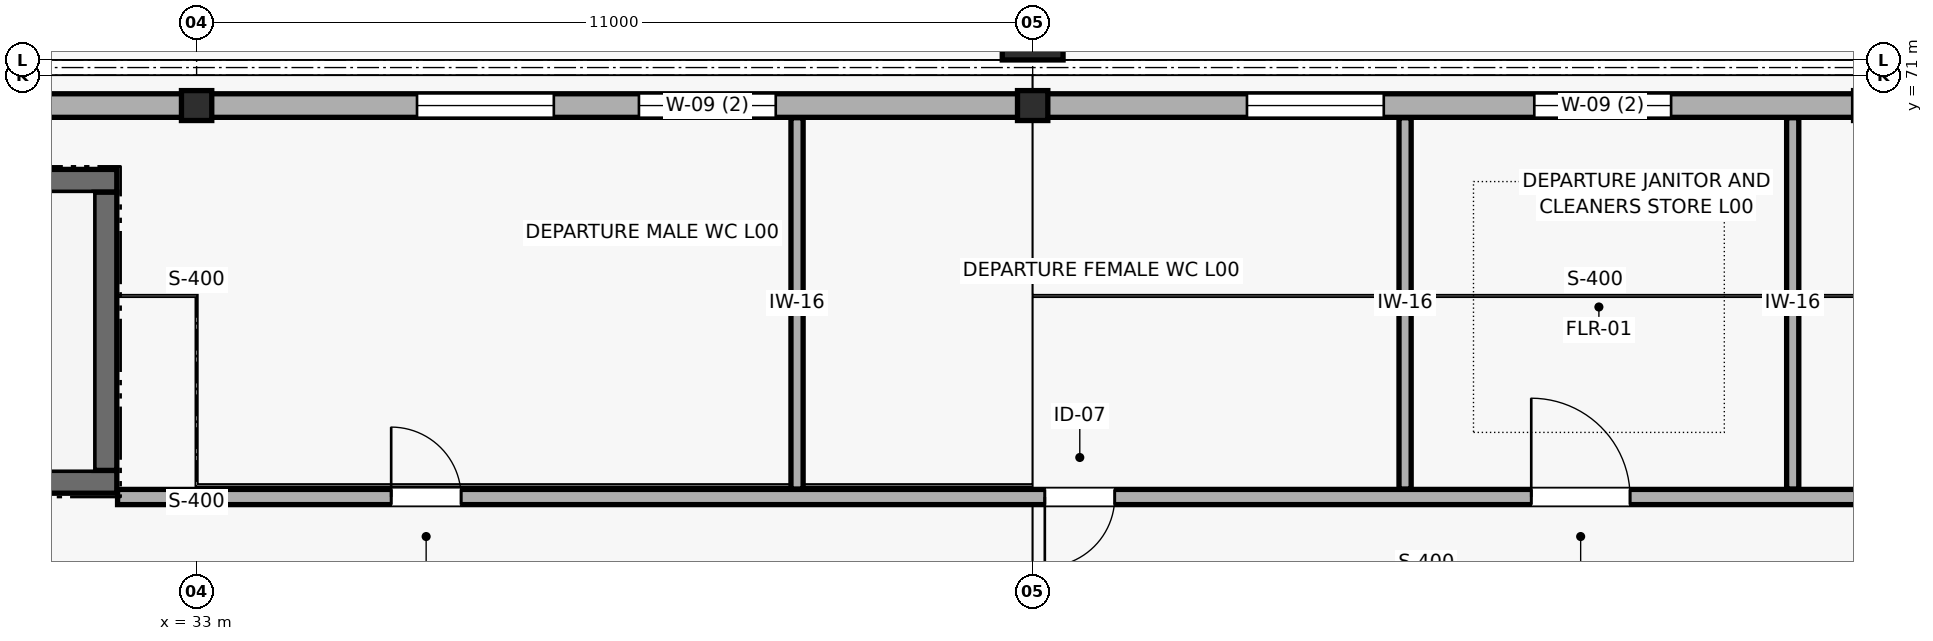
"""IFC4 building model, lengths in metres.
Left out: names, types, materials, properties, quantities, classifications, styles, units other than length and angle.
Written with IfcOpenShell. Run it as: python <this file> out.ifc"""

import sys

from ifc_helpers import new_model, si_unit, direction, frame, frame_2d, origin, origin_2d, place, context, subcontext, project, spatial, rectangle, i_section, extrude, element, fill, save


model = new_model("IFC4")
c1 = context("Model", 3, precision=1e-05, world=origin(), true_north=direction((0.0, 1.0)))
c2 = subcontext(c1, "Body", "Model", "MODEL_VIEW")
j1 = project(units=[si_unit("LENGTHUNIT", "METRE"), si_unit("PLANEANGLEUNIT", "RADIAN")], contexts=[c1])
p1 = place(None, origin())
s1 = spatial("IfcSite", under=j1, at=p1, CompositionType="ELEMENT")
p2 = place(p1, origin())
s2 = spatial("IfcBuilding", under=s1, at=p2, CompositionType="ELEMENT")
p3 = place(p2, origin())
s3 = spatial("IfcBuildingStorey", under=s2, at=p3, CompositionType="ELEMENT", Elevation=0.0)
for number, where, z_axis, x_axis in (
    (1, (33.0, 70.6, 0.0), (0.0, 0.0, 1.0), (1.0, 0.0, 0.0)),
    (2, (44.0, 70.6, 0.0), (0.0, 0.0, 1.0), (1.0, 0.0, 0.0)),
):
    element("IfcColumn", number, at=place(p3, frame(where, z_axis=z_axis, x_axis=x_axis)), inside=s3, PredefinedType="COLUMN", context=c2, shape_type="SweptSolid", body=[
        extrude(i_section(OverallWidth=0.399, OverallDepth=0.394, WebThickness=0.023, FlangeThickness=0.037, FilletRadius=0.018, at=origin_2d()), origin(), (0.0, 0.0, 1.0), 5.4),
    ])
p4 = place(p3, frame((44.0, 71.6, 0.0), z_axis=(0.0, 0.0, 1.0), x_axis=(1.0, 0.0, 0.0)))
e3 = element("IfcColumn", 3, at=p4, inside=s3, PredefinedType="COLUMN", context=c2, shape_type="SweptSolid", body=[
    extrude(rectangle(XDim=0.8, YDim=0.8, at=origin_2d()), origin(), (0.0, 0.0, 1.0), 5.4),
])
p5 = place(p3, frame((32.991, 70.6, 0.0), z_axis=(0.0, 0.0, 1.0), x_axis=(-1.0, 0.0, 0.0)))
e4 = element("IfcWall", 4, at=p5, inside=s3, PredefinedType="SOLIDWALL", context=c2, shape_type="SweptSolid", body=[
    extrude(rectangle(XDim=10.981, YDim=0.31, at=frame_2d((5.491, 0.0))), origin(), (0.0, 0.0, 1.0), 4.315),
])
p6 = place(p5, frame((2.591, 0.0, 1.05)))
e5 = element("IfcOpeningElement", 5, at=p6, cuts=e4, PredefinedType="OPENING", context=c2, shape_type="SweptSolid", body=[
    extrude(rectangle(XDim=1.8, YDim=1.8, at=frame_2d((0.9, 0.9))), frame((0.0, 0.165, 0.0), z_axis=(0.0, -1.0, 0.0), x_axis=(1.0, 0.0, 0.0)), (0.0, 0.0, 1.0), 0.33),
])
p7 = place(p5, frame((6.291, 0.0, 1.05)))
e6 = element("IfcOpeningElement", 6, at=p7, cuts=e4, PredefinedType="OPENING", context=c2, shape_type="SweptSolid", body=[
    extrude(rectangle(XDim=1.8, YDim=1.8, at=frame_2d((0.9, 0.9))), frame((0.0, 0.165, 0.0), z_axis=(0.0, -1.0, 0.0), x_axis=(1.0, 0.0, 0.0)), (0.0, 0.0, 1.0), 0.33),
])
p8 = place(p3, frame((43.991, 70.6, 0.0), z_axis=(0.0, 0.0, 1.0), x_axis=(-1.0, 0.0, 0.0)))
e7 = element("IfcWall", 7, at=p8, inside=s3, PredefinedType="SOLIDWALL", context=c2, shape_type="SweptSolid", body=[
    extrude(rectangle(XDim=10.981, YDim=0.31, at=frame_2d((5.491, 0.0))), origin(), (0.0, 0.0, 1.0), 4.315),
])
p9 = place(p8, frame((3.371, 0.0, 1.05)))
e8 = element("IfcOpeningElement", 8, at=p9, cuts=e7, PredefinedType="OPENING", context=c2, shape_type="SweptSolid", body=[
    extrude(rectangle(XDim=1.8, YDim=1.8, at=frame_2d((0.9, 0.9))), frame((0.0, 0.165, 0.0), z_axis=(0.0, -1.0, 0.0), x_axis=(1.0, 0.0, 0.0)), (0.0, 0.0, 1.0), 0.33),
])
p10 = place(p8, frame((6.291, 0.0, 1.05)))
e9 = element("IfcOpeningElement", 9, at=p10, cuts=e7, PredefinedType="OPENING", context=c2, shape_type="SweptSolid", body=[
    extrude(rectangle(XDim=1.8, YDim=1.8, at=frame_2d((0.9, 0.9))), frame((0.0, 0.165, 0.0), z_axis=(0.0, -1.0, 0.0), x_axis=(1.0, 0.0, 0.0)), (0.0, 0.0, 1.0), 0.33),
])
p11 = place(p3, frame((54.991, 70.6, 0.0), z_axis=(0.0, 0.0, 1.0), x_axis=(-1.0, 0.0, 0.0)))
e10 = element("IfcWall", 10, at=p11, inside=s3, PredefinedType="SOLIDWALL", context=c2, shape_type="SweptSolid", body=[
    extrude(rectangle(XDim=10.981, YDim=0.31, at=frame_2d((5.491, 0.0))), origin(), (0.0, 0.0, 1.0), 4.315),
])
p12 = place(p11, frame((2.591, 0.0, 1.05)))
e11 = element("IfcOpeningElement", 11, at=p12, cuts=e10, PredefinedType="OPENING", context=c2, shape_type="SweptSolid", body=[
    extrude(rectangle(XDim=1.8, YDim=1.8, at=frame_2d((0.9, 0.9))), frame((0.0, 0.165, 0.0), z_axis=(0.0, -1.0, 0.0), x_axis=(1.0, 0.0, 0.0)), (0.0, 0.0, 1.0), 0.33),
])
p13 = place(p11, frame((6.371, 0.0, 1.05)))
e12 = element("IfcOpeningElement", 12, at=p13, cuts=e10, PredefinedType="OPENING", context=c2, shape_type="SweptSolid", body=[
    extrude(rectangle(XDim=1.8, YDim=1.8, at=frame_2d((0.9, 0.9))), frame((0.0, 0.165, 0.0), z_axis=(0.0, -1.0, 0.0), x_axis=(1.0, 0.0, 0.0)), (0.0, 0.0, 1.0), 0.33),
])
p14 = place(p3, frame((23.3, 65.65, 0.0), z_axis=(0.0, 0.0, 1.0), x_axis=(1.0, 0.0, 0.0)))
e13 = element("IfcWall", 13, at=p14, inside=s3, PredefinedType="SHEAR", context=c2, shape_type="SweptSolid", body=[
    extrude(rectangle(XDim=8.65, YDim=0.3, at=frame_2d((4.325, 0.0))), origin(), (0.0, 0.0, 1.0), 5.1),
])
p15 = place(p14, frame((0.55, 0.0, 0.0)))
e14 = element("IfcOpeningElement", 14, at=p15, cuts=e13, PredefinedType="OPENING", context=c2, shape_type="SweptSolid", body=[
    extrude(rectangle(XDim=1.35, YDim=2.2, at=frame_2d((0.675, 1.1))), frame((0.0, 0.16, 0.0), z_axis=(0.0, -1.0, 0.0), x_axis=(1.0, 0.0, 0.0)), (0.0, 0.0, 1.0), 0.32),
])
p16 = place(p3, frame((31.95, 69.61, 0.0), z_axis=(0.0, 0.0, 1.0), x_axis=(-1.0, 0.0, 0.0)))
e15 = element("IfcWall", 15, at=p16, inside=s3, PredefinedType="SHEAR", context=c2, shape_type="SweptSolid", body=[
    extrude(rectangle(XDim=8.65, YDim=0.3, at=frame_2d((4.325, 0.0))), origin(), (0.0, 0.0, 1.0), 5.1),
])
p17 = place(p3, frame((31.8, 65.8, 0.0), z_axis=(0.0, 0.0, 1.0), x_axis=(0.0, 1.0, 0.0)))
e16 = element("IfcWall", 16, at=p17, inside=s3, PredefinedType="SHEAR", context=c2, shape_type="SweptSolid", body=[
    extrude(rectangle(XDim=3.66, YDim=0.3, at=frame_2d((1.83, 0.0))), origin(), (0.0, 0.0, 1.0), 5.1),
])
p18 = place(p3, frame((31.96, 65.45, 0.0), z_axis=(0.0, 0.0, 1.0), x_axis=(1.0, 0.0, 0.0)))
e17 = element("IfcWall", 17, at=p18, inside=s3, PredefinedType="PARTITIONING", context=c2, shape_type="SweptSolid", body=[
    extrude(rectangle(XDim=26.455, YDim=0.2, at=frame_2d((13.228, 0.0))), origin(), (0.0, 0.0, 1.0), 4.483),
])
p19 = place(p18, frame((3.6, 0.0, 0.0)))
e18 = element("IfcOpeningElement", 18, at=p19, cuts=e17, PredefinedType="OPENING", context=c2, shape_type="SweptSolid", body=[
    extrude(rectangle(XDim=0.92, YDim=2.1, at=frame_2d((0.46, 1.05))), frame((0.0, 0.11, 0.0), z_axis=(0.0, -1.0, 0.0), x_axis=(1.0, 0.0, 0.0)), (0.0, 0.0, 1.0), 0.22),
])
p20 = place(p18, frame((12.2, 0.0, 0.0)))
e19 = element("IfcOpeningElement", 19, at=p20, cuts=e17, PredefinedType="OPENING", context=c2, shape_type="SweptSolid", body=[
    extrude(rectangle(XDim=0.92, YDim=2.1, at=frame_2d((0.46, 1.05))), frame((0.0, 0.11, 0.0), z_axis=(0.0, -1.0, 0.0), x_axis=(1.0, 0.0, 0.0)), (0.0, 0.0, 1.0), 0.22),
])
p21 = place(p18, frame((18.6, 0.0, 0.0)))
e20 = element("IfcOpeningElement", 20, at=p21, cuts=e17, PredefinedType="OPENING", context=c2, shape_type="SweptSolid", body=[
    extrude(rectangle(XDim=1.3, YDim=2.25, at=frame_2d((0.65, 1.125))), frame((0.0, 0.11, 0.0), z_axis=(0.0, -1.0, 0.0), x_axis=(1.0, 0.0, 0.0)), (0.0, 0.0, 1.0), 0.22),
])
p22 = place(p18, frame((23.4, 0.0, 0.0)))
e21 = element("IfcOpeningElement", 21, at=p22, cuts=e17, PredefinedType="OPENING", context=c2, shape_type="SweptSolid", body=[
    extrude(rectangle(XDim=1.02, YDim=2.15, at=frame_2d((0.51, 1.075))), frame((0.0, 0.11, 0.0), z_axis=(0.0, -1.0, 0.0), x_axis=(1.0, 0.0, 0.0)), (0.0, 0.0, 1.0), 0.22),
])
for number, where, z_axis, x_axis in (
    (22, (40.9, 65.555, 0.0), (0.0, 0.0, 1.0), (0.0, 1.0, 0.0)),
    (23, (48.9, 65.555, 0.0), (0.0, 0.0, 1.0), (0.0, 1.0, 0.0)),
    (24, (54.0, 65.555, 0.0), (0.0, 0.0, 1.0), (0.0, 1.0, 0.0)),
):
    element("IfcWall", number, at=place(p3, frame(where, z_axis=z_axis, x_axis=x_axis)), inside=s3, PredefinedType="PARTITIONING", context=c2, shape_type="SweptSolid", body=[
        extrude(rectangle(XDim=4.885, YDim=0.16, at=frame_2d((2.442, 0.0))), origin(), (0.0, 0.0, 1.0), 4.638),
    ])
p23 = place(p9, origin())
e25 = element("IfcWindow", 25, at=p23, inside=s3, PartitioningType="SINGLE_PANEL", PredefinedType="WINDOW", context=c2, shape_type="SweptSolid", body=[
    extrude(rectangle(XDim=1.8, YDim=1.8, at=frame_2d((0.9, 0.9))), frame((0.0, 0.03, 0.0), z_axis=(0.0, -1.0, 0.0), x_axis=(1.0, 0.0, 0.0)), (0.0, 0.0, 1.0), 0.06),
])
fill(e8, e25)
p24 = place(p10, origin())
e26 = element("IfcWindow", 26, at=p24, inside=s3, PartitioningType="SINGLE_PANEL", PredefinedType="WINDOW", context=c2, shape_type="SweptSolid", body=[
    extrude(rectangle(XDim=1.8, YDim=1.8, at=frame_2d((0.9, 0.9))), frame((0.0, 0.03, 0.0), z_axis=(0.0, -1.0, 0.0), x_axis=(1.0, 0.0, 0.0)), (0.0, 0.0, 1.0), 0.06),
])
fill(e9, e26)
p25 = place(p12, origin())
e27 = element("IfcWindow", 27, at=p25, inside=s3, PartitioningType="SINGLE_PANEL", PredefinedType="WINDOW", context=c2, shape_type="SweptSolid", body=[
    extrude(rectangle(XDim=1.8, YDim=1.8, at=frame_2d((0.9, 0.9))), frame((0.0, 0.03, 0.0), z_axis=(0.0, -1.0, 0.0), x_axis=(1.0, 0.0, 0.0)), (0.0, 0.0, 1.0), 0.06),
])
fill(e11, e27)
p26 = place(p13, origin())
e28 = element("IfcWindow", 28, at=p26, inside=s3, PartitioningType="SINGLE_PANEL", PredefinedType="WINDOW", context=c2, shape_type="SweptSolid", body=[
    extrude(rectangle(XDim=1.8, YDim=1.8, at=frame_2d((0.9, 0.9))), frame((0.0, 0.03, 0.0), z_axis=(0.0, -1.0, 0.0), x_axis=(1.0, 0.0, 0.0)), (0.0, 0.0, 1.0), 0.06),
])
fill(e12, e28)
p27 = place(p19, origin())
e29 = element("IfcDoor", 29, at=p27, inside=s3, OperationType="SINGLE_SWING_LEFT", PredefinedType="DOOR", context=c2, shape_type="SweptSolid", body=[
    extrude(rectangle(XDim=0.92, YDim=2.1, at=frame_2d((0.46, 1.05))), frame((0.0, 0.025, 0.0), z_axis=(0.0, -1.0, 0.0), x_axis=(1.0, 0.0, 0.0)), (0.0, 0.0, 1.0), 0.05),
])
fill(e18, e29)
p28 = place(p20, frame((0.92, 0.0, 0.0), z_axis=(0.0, 0.0, 1.0), x_axis=(-1.0, 0.0, 0.0)))
e30 = element("IfcDoor", 30, at=p28, inside=s3, OperationType="SINGLE_SWING_RIGHT", PredefinedType="DOOR", context=c2, shape_type="SweptSolid", body=[
    extrude(rectangle(XDim=0.92, YDim=2.1, at=frame_2d((0.46, 1.05))), frame((0.0, 0.025, 0.0), z_axis=(0.0, -1.0, 0.0), x_axis=(1.0, 0.0, 0.0)), (0.0, 0.0, 1.0), 0.05),
])
fill(e19, e30)
p29 = place(p21, origin())
e31 = element("IfcDoor", 31, at=p29, inside=s3, OperationType="SINGLE_SWING_LEFT", PredefinedType="DOOR", context=c2, shape_type="SweptSolid", body=[
    extrude(rectangle(XDim=1.3, YDim=2.25, at=frame_2d((0.65, 1.125))), frame((0.0, 0.025, 0.0), z_axis=(0.0, -1.0, 0.0), x_axis=(1.0, 0.0, 0.0)), (0.0, 0.0, 1.0), 0.05),
])
fill(e20, e31)
save(model, sys.argv[1])
